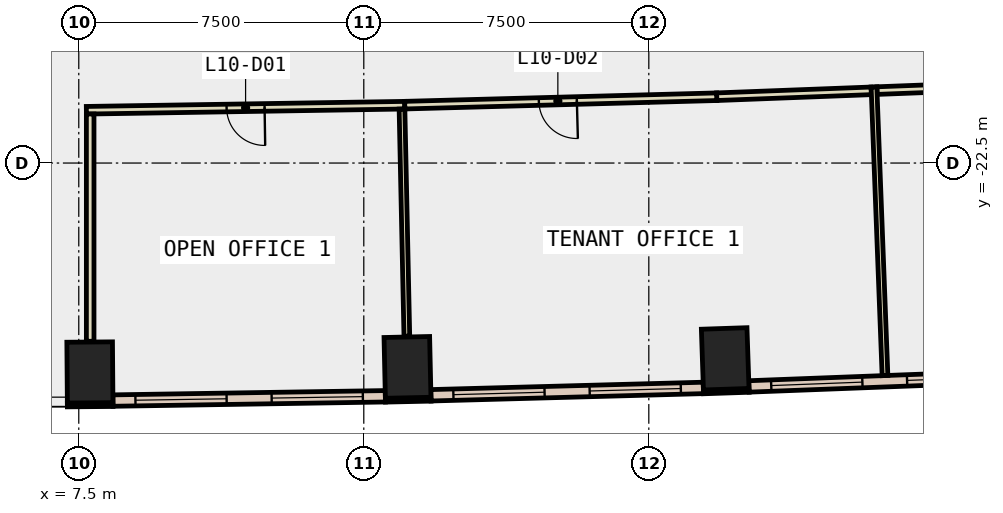
"""IFC4 building model, lengths in metres.
Left out: names, types, materials, properties, quantities, classifications, styles, units other than length and angle.
Written with IfcOpenShell. Run it as: python <this file> out.ifc"""

import sys

from ifc_helpers import new_model, si_unit, direction, frame, frame_2d, origin, origin_2d, place, context, subcontext, project, spatial, rectangle, extrude, element, fill, save


model = new_model("IFC4")
c1 = context("Model", 3, precision=1e-05, world=origin(), true_north=direction((0.0, 1.0)))
c2 = subcontext(c1, "Body", "Model", "MODEL_VIEW")
j1 = project(units=[si_unit("LENGTHUNIT", "METRE"), si_unit("PLANEANGLEUNIT", "RADIAN")], contexts=[c1])
p1 = place(None, origin())
s1 = spatial("IfcSite", under=j1, at=p1, CompositionType="ELEMENT")
p2 = place(p1, origin())
s2 = spatial("IfcBuilding", under=s1, at=p2, CompositionType="ELEMENT")
p3 = place(p2, frame((0.0, 0.0, 51.8)))
s3 = spatial("IfcBuildingStorey", under=s2, at=p3, CompositionType="ELEMENT", Elevation=51.8)
for number, where, z_axis, x_axis in (
    (1, (7.793, -28.01, -0.4), (0.0, 0.0, 1.0), (1.0, 0.008, 0.0)),
    (2, (16.15, -27.877, -0.4), (0.0, 0.0, 1.0), (1.0, 0.022, 0.0)),
    (3, (24.51, -27.652, -0.4), (0.0, 0.0, 1.0), (0.999, 0.034, 0.0)),
):
    element("IfcColumn", number, at=place(p3, frame(where, z_axis=z_axis, x_axis=x_axis)), inside=s3, PredefinedType="COLUMN", context=c2, shape_type="SweptSolid", body=[
        extrude(rectangle(XDim=1.2, YDim=1.6, at=origin_2d()), origin(), (0.0, 0.0, 1.0), 4.2),
    ])
p4 = place(p3, frame((7.2, -28.865, 0.0), z_axis=(0.0, 0.0, 1.0), x_axis=(0.999965208912, 0.008341520563, 0.0)))
e4 = element("IfcWall", 4, at=p4, inside=s3, PredefinedType="STANDARD", context=c2, shape_type="SweptSolid", body=[
    extrude(rectangle(XDim=1.2, YDim=0.1, at=frame_2d((0.6, 0.0))), origin(), (0.0, 0.0, 1.0), 3.8),
])
p5 = place(p3, frame((15.569, -28.74, 0.0), z_axis=(0.0, 0.0, 1.0), x_axis=(0.99976752127, 0.021561618973, 0.0)))
e5 = element("IfcWall", 5, at=p5, inside=s3, PredefinedType="STANDARD", context=c2, shape_type="SweptSolid", body=[
    extrude(rectangle(XDim=1.2, YDim=0.1, at=frame_2d((0.6, 0.0))), origin(), (0.0, 0.0, 1.0), 3.8),
])
p6 = place(p3, frame((23.939, -28.521, 0.0), z_axis=(0.0, 0.0, 1.0), x_axis=(0.999442872267, 0.03337581573, 0.0)))
e6 = element("IfcWall", 6, at=p6, inside=s3, PredefinedType="STANDARD", context=c2, shape_type="SweptSolid", body=[
    extrude(rectangle(XDim=1.2, YDim=0.1, at=frame_2d((0.6, 0.0))), origin(), (0.0, 0.0, 1.0), 3.8),
])
p7 = place(p3, frame((8.398, -28.75, 0.0), z_axis=(0.0, 0.0, 1.0), x_axis=(0.999875756772, 0.015762963512, 0.0)))
e7 = element("IfcWall", 7, at=p7, inside=s3, PredefinedType="STANDARD", context=c2, shape_type="SweptSolid", body=[
    extrude(rectangle(XDim=7.171, YDim=0.3, at=frame_2d((3.585, 0.0))), origin(), (0.0, 0.0, 1.0), 3.8),
])
p8 = place(p7, frame((0.593, 0.0, 0.9)))
e8 = element("IfcOpeningElement", 8, at=p8, cuts=e7, PredefinedType="OPENING", context=c2, shape_type="SweptSolid", body=[
    extrude(rectangle(XDim=2.4, YDim=2.6, at=frame_2d((1.2, 1.3))), frame((0.0, 0.16, 0.0), z_axis=(0.0, -1.0, 0.0), x_axis=(1.0, 0.0, 0.0)), (0.0, 0.0, 1.0), 0.32),
])
p9 = place(p7, frame((4.178, 0.0, 0.9)))
e9 = element("IfcOpeningElement", 9, at=p9, cuts=e7, PredefinedType="OPENING", context=c2, shape_type="SweptSolid", body=[
    extrude(rectangle(XDim=2.4, YDim=2.6, at=frame_2d((1.2, 1.3))), frame((0.0, 0.16, 0.0), z_axis=(0.0, -1.0, 0.0), x_axis=(1.0, 0.0, 0.0)), (0.0, 0.0, 1.0), 0.32),
])
p10 = place(p3, frame((16.765, -28.611, 0.0), z_axis=(0.0, 0.0, 1.0), x_axis=(0.999633925798, 0.027055764512, 0.0)))
e10 = element("IfcWall", 10, at=p10, inside=s3, PredefinedType="STANDARD", context=c2, shape_type="SweptSolid", body=[
    extrude(rectangle(XDim=7.174, YDim=0.3, at=frame_2d((3.587, 0.0))), origin(), (0.0, 0.0, 1.0), 3.8),
])
p11 = place(p10, frame((0.593, 0.0, 0.9)))
e11 = element("IfcOpeningElement", 11, at=p11, cuts=e10, PredefinedType="OPENING", context=c2, shape_type="SweptSolid", body=[
    extrude(rectangle(XDim=2.4, YDim=2.6, at=frame_2d((1.2, 1.3))), frame((0.0, 0.16, 0.0), z_axis=(0.0, -1.0, 0.0), x_axis=(1.0, 0.0, 0.0)), (0.0, 0.0, 1.0), 0.32),
])
p12 = place(p10, frame((4.18, 0.0, 0.9)))
e12 = element("IfcOpeningElement", 12, at=p12, cuts=e10, PredefinedType="OPENING", context=c2, shape_type="SweptSolid", body=[
    extrude(rectangle(XDim=2.4, YDim=2.6, at=frame_2d((1.2, 1.3))), frame((0.0, 0.16, 0.0), z_axis=(0.0, -1.0, 0.0), x_axis=(1.0, 0.0, 0.0)), (0.0, 0.0, 1.0), 0.32),
])
p13 = place(p3, frame((25.134, -28.378, 0.0), z_axis=(0.0, 0.0, 1.0), x_axis=(0.999276920032, 0.038021534562, 0.0)))
e13 = element("IfcWall", 13, at=p13, inside=s3, PredefinedType="STANDARD", context=c2, shape_type="SweptSolid", body=[
    extrude(rectangle(XDim=7.153, YDim=0.3, at=frame_2d((3.577, 0.0))), origin(), (0.0, 0.0, 1.0), 3.8),
])
p14 = place(p13, frame((0.588, 0.0, 0.9)))
e14 = element("IfcOpeningElement", 14, at=p14, cuts=e13, PredefinedType="OPENING", context=c2, shape_type="SweptSolid", body=[
    extrude(rectangle(XDim=2.4, YDim=2.6, at=frame_2d((1.2, 1.3))), frame((0.0, 0.16, 0.0), z_axis=(0.0, -1.0, 0.0), x_axis=(1.0, 0.0, 0.0)), (0.0, 0.0, 1.0), 0.32),
])
p15 = place(p13, frame((4.165, 0.0, 0.9)))
e15 = element("IfcOpeningElement", 15, at=p15, cuts=e13, PredefinedType="OPENING", context=c2, shape_type="SweptSolid", body=[
    extrude(rectangle(XDim=2.4, YDim=2.6, at=frame_2d((1.2, 1.3))), frame((0.0, 0.16, 0.0), z_axis=(0.0, -1.0, 0.0), x_axis=(1.0, 0.0, 0.0)), (0.0, 0.0, 1.0), 0.32),
])
p16 = place(p3, frame((16.078, -20.978, 0.0), z_axis=(0.0, 0.0, 1.0), x_axis=(-0.999873907997, -0.015879801838, 0.0)))
e16 = element("IfcWall", 16, at=p16, inside=s3, PredefinedType="PARTITIONING", context=c2, shape_type="SweptSolid", body=[
    extrude(rectangle(XDim=8.379, YDim=0.2, at=frame_2d((4.189, 0.0))), origin(), (0.0, 0.0, 1.0), 3.8),
])
p17 = place(p16, frame((3.689, 0.0, 0.0)))
e17 = element("IfcOpeningElement", 17, at=p17, cuts=e16, PredefinedType="OPENING", context=c2, shape_type="SweptSolid", body=[
    extrude(rectangle(XDim=1.0, YDim=2.1, at=frame_2d((0.5, 1.05))), frame((0.0, 0.11, 0.0), z_axis=(0.0, -1.0, 0.0), x_axis=(1.0, 0.0, 0.0)), (0.0, 0.0, 1.0), 0.22),
])
p18 = place(p3, frame((28.354, -20.6, 0.0), z_axis=(0.0, 0.0, 1.0), x_axis=(-0.999276945714, -0.038020859604, 0.0)))
e18 = element("IfcWall", 18, at=p18, inside=s3, PredefinedType="PARTITIONING", context=c2, shape_type="SweptSolid", body=[
    extrude(rectangle(XDim=4.071, YDim=0.2, at=frame_2d((2.036, 0.0))), origin(), (0.0, 0.0, 1.0), 3.8),
])
p19 = place(p3, frame((24.286, -20.755, 0.0), z_axis=(0.0, 0.0, 1.0), x_axis=(-0.999633883909, -0.027057312146, 0.0)))
e19 = element("IfcWall", 19, at=p19, inside=s3, PredefinedType="PARTITIONING", context=c2, shape_type="SweptSolid", body=[
    extrude(rectangle(XDim=8.211, YDim=0.2, at=frame_2d((4.105, 0.0))), origin(), (0.0, 0.0, 1.0), 3.8),
])
p20 = place(p19, frame((3.681, 0.0, 0.0)))
e20 = element("IfcOpeningElement", 20, at=p20, cuts=e19, PredefinedType="OPENING", context=c2, shape_type="SweptSolid", body=[
    extrude(rectangle(XDim=1.0, YDim=2.1, at=frame_2d((0.5, 1.05))), frame((0.0, 0.11, 0.0), z_axis=(0.0, -1.0, 0.0), x_axis=(1.0, 0.0, 0.0)), (0.0, 0.0, 1.0), 0.22),
])
p21 = place(p3, frame((31.909, -20.464, 0.0), z_axis=(0.0, 0.0, 1.0), x_axis=(-0.999273295147, -0.038116684091, 0.0)))
e21 = element("IfcWall", 21, at=p21, inside=s3, PredefinedType="PARTITIONING", context=c2, shape_type="SweptSolid", body=[
    extrude(rectangle(XDim=3.407, YDim=0.2, at=frame_2d((1.704, 0.0))), origin(), (0.0, 0.0, 1.0), 3.8),
])
p22 = place(p3, frame((7.8, -21.209, 0.0), z_axis=(0.0, 0.0, 1.0), x_axis=(0.0, -1.0, 0.0)))
e22 = element("IfcWall", 22, at=p22, inside=s3, PredefinedType="PARTITIONING", context=c2, shape_type="SweptSolid", body=[
    extrude(rectangle(XDim=5.981, YDim=0.2, at=frame_2d((2.99, 0.0))), origin(), (0.0, 0.0, 1.0), 3.8),
])
p23 = place(p3, frame((16.005, -21.079, 0.0), z_axis=(0.0, 0.0, 1.0), x_axis=(0.021436771826, -0.999770206004, 0.0)))
e23 = element("IfcWall", 23, at=p23, inside=s3, PredefinedType="PARTITIONING", context=c2, shape_type="SweptSolid", body=[
    extrude(rectangle(XDim=5.979, YDim=0.15, at=frame_2d((2.99, 0.0))), origin(), (0.0, 0.0, 1.0), 3.8),
])
p24 = place(p3, frame((28.425, -20.497, 0.0), z_axis=(0.0, 0.0, 1.0), x_axis=(0.03816049016, -0.999271623229, 0.0)))
e24 = element("IfcWall", 24, at=p24, inside=s3, PredefinedType="PARTITIONING", context=c2, shape_type="SweptSolid", body=[
    extrude(rectangle(XDim=7.601, YDim=0.15, at=frame_2d((3.8, 0.0))), origin(), (0.0, 0.0, 1.0), 3.8),
])
p25 = place(p8, origin())
e25 = element("IfcWindow", 25, at=p25, inside=s3, PartitioningType="SINGLE_PANEL", PredefinedType="WINDOW", context=c2, shape_type="SweptSolid", body=[
    extrude(rectangle(XDim=2.4, YDim=2.6, at=frame_2d((1.2, 1.3))), frame((0.0, 0.03, 0.0), z_axis=(0.0, -1.0, 0.0), x_axis=(1.0, 0.0, 0.0)), (0.0, 0.0, 1.0), 0.06),
])
fill(e8, e25)
p26 = place(p9, origin())
e26 = element("IfcWindow", 26, at=p26, inside=s3, PartitioningType="SINGLE_PANEL", PredefinedType="WINDOW", context=c2, shape_type="SweptSolid", body=[
    extrude(rectangle(XDim=2.4, YDim=2.6, at=frame_2d((1.2, 1.3))), frame((0.0, 0.03, 0.0), z_axis=(0.0, -1.0, 0.0), x_axis=(1.0, 0.0, 0.0)), (0.0, 0.0, 1.0), 0.06),
])
fill(e9, e26)
p27 = place(p11, origin())
e27 = element("IfcWindow", 27, at=p27, inside=s3, PartitioningType="SINGLE_PANEL", PredefinedType="WINDOW", context=c2, shape_type="SweptSolid", body=[
    extrude(rectangle(XDim=2.4, YDim=2.6, at=frame_2d((1.2, 1.3))), frame((0.0, 0.03, 0.0), z_axis=(0.0, -1.0, 0.0), x_axis=(1.0, 0.0, 0.0)), (0.0, 0.0, 1.0), 0.06),
])
fill(e11, e27)
p28 = place(p12, origin())
e28 = element("IfcWindow", 28, at=p28, inside=s3, PartitioningType="SINGLE_PANEL", PredefinedType="WINDOW", context=c2, shape_type="SweptSolid", body=[
    extrude(rectangle(XDim=2.4, YDim=2.6, at=frame_2d((1.2, 1.3))), frame((0.0, 0.03, 0.0), z_axis=(0.0, -1.0, 0.0), x_axis=(1.0, 0.0, 0.0)), (0.0, 0.0, 1.0), 0.06),
])
fill(e12, e28)
p29 = place(p14, origin())
e29 = element("IfcWindow", 29, at=p29, inside=s3, PartitioningType="SINGLE_PANEL", PredefinedType="WINDOW", context=c2, shape_type="SweptSolid", body=[
    extrude(rectangle(XDim=2.4, YDim=2.6, at=frame_2d((1.2, 1.3))), frame((0.0, 0.03, 0.0), z_axis=(0.0, -1.0, 0.0), x_axis=(1.0, 0.0, 0.0)), (0.0, 0.0, 1.0), 0.06),
])
fill(e14, e29)
p30 = place(p15, origin())
e30 = element("IfcWindow", 30, at=p30, inside=s3, PartitioningType="SINGLE_PANEL", PredefinedType="WINDOW", context=c2, shape_type="SweptSolid", body=[
    extrude(rectangle(XDim=2.4, YDim=2.6, at=frame_2d((1.2, 1.3))), frame((0.0, 0.03, 0.0), z_axis=(0.0, -1.0, 0.0), x_axis=(1.0, 0.0, 0.0)), (0.0, 0.0, 1.0), 0.06),
])
fill(e15, e30)
p31 = place(p17, origin())
e31 = element("IfcDoor", 31, at=p31, inside=s3, OperationType="SINGLE_SWING_RIGHT", PredefinedType="DOOR", context=c2, shape_type="SweptSolid", body=[
    extrude(rectangle(XDim=1.0, YDim=2.1, at=frame_2d((0.5, 1.05))), frame((0.0, 0.025, 0.0), z_axis=(0.0, -1.0, 0.0), x_axis=(1.0, 0.0, 0.0)), (0.0, 0.0, 1.0), 0.05),
])
fill(e17, e31)
p32 = place(p20, origin())
e32 = element("IfcDoor", 32, at=p32, inside=s3, OperationType="SINGLE_SWING_RIGHT", PredefinedType="DOOR", context=c2, shape_type="SweptSolid", body=[
    extrude(rectangle(XDim=1.0, YDim=2.1, at=frame_2d((0.5, 1.05))), frame((0.0, 0.025, 0.0), z_axis=(0.0, -1.0, 0.0), x_axis=(1.0, 0.0, 0.0)), (0.0, 0.0, 1.0), 0.05),
])
fill(e20, e32)
save(model, sys.argv[1])
